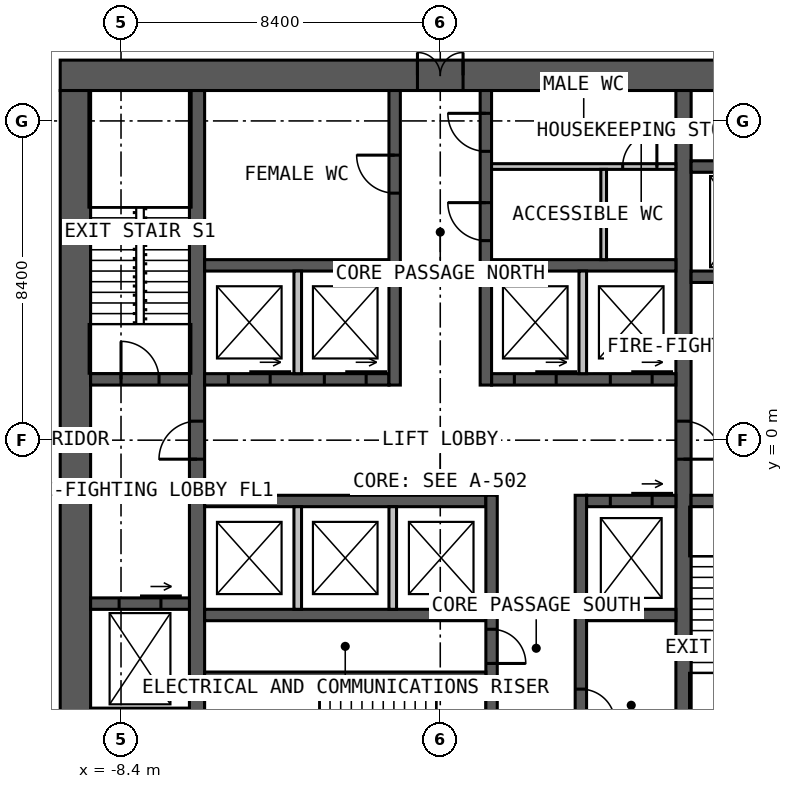
"""IFC4 building model, lengths in metres.
Left out: names, types, materials, properties, quantities, classifications, styles, units other than length and angle.
Written with IfcOpenShell. Run it as: python <this file> out.ifc"""

import sys

from ifc_helpers import new_model, si_unit, direction, frame, frame_2d, origin, place, context, subcontext, project, spatial, rectangle, extrude, element, fill, save


model = new_model("IFC4")
c1 = context("Model", 3, precision=1e-05, world=origin(), true_north=direction((0.0, 1.0)))
c2 = subcontext(c1, "Body", "Model", "MODEL_VIEW")
j1 = project(units=[si_unit("LENGTHUNIT", "METRE"), si_unit("PLANEANGLEUNIT", "RADIAN")], contexts=[c1])
p1 = place(None, origin())
s1 = spatial("IfcSite", under=j1, at=p1, CompositionType="ELEMENT")
p2 = place(p1, origin())
s2 = spatial("IfcBuilding", under=s1, at=p2, CompositionType="ELEMENT")
p3 = place(p2, frame((0.0, 0.0, 57.0)))
s3 = spatial("IfcBuildingStorey", under=s2, at=p3, CompositionType="ELEMENT", Elevation=57.0)
p4 = place(p3, frame((-10.0, 9.6, 0.0), z_axis=(0.0, 0.0, 1.0), x_axis=(1.0, 0.0, 0.0)))
e1 = element("IfcWall", 1, at=p4, inside=s3, PredefinedType="SOLIDWALL", context=c2, shape_type="SweptSolid", body=[
    extrude(rectangle(XDim=20.0, YDim=0.8, at=frame_2d((10.0, 0.0))), origin(), (0.0, 0.0, 1.0), 4.0),
])
p5 = place(p4, frame((9.4, 0.0, 0.0)))
e2 = element("IfcOpeningElement", 2, at=p5, cuts=e1, PredefinedType="OPENING", context=c2, shape_type="SweptSolid", body=[
    extrude(rectangle(XDim=1.2, YDim=2.2, at=frame_2d((0.6, 1.1))), frame((0.0, 0.41, 0.0), z_axis=(0.0, -1.0, 0.0), x_axis=(1.0, 0.0, 0.0)), (0.0, 0.0, 1.0), 0.82),
])
p6 = place(p3, frame((-9.6, 9.2, 0.0), z_axis=(0.0, 0.0, 1.0), x_axis=(0.0, -1.0, 0.0)))
e3 = element("IfcWall", 3, at=p6, inside=s3, PredefinedType="SOLIDWALL", context=c2, shape_type="SweptSolid", body=[
    extrude(rectangle(XDim=18.4, YDim=0.8, at=frame_2d((9.2, 0.0))), origin(), (0.0, 0.0, 1.0), 4.0),
])
p7 = place(p3, frame((-6.4, -9.2, 0.0), z_axis=(0.0, 0.0, 1.0), x_axis=(0.0, 1.0, 0.0)))
e4 = element("IfcWall", 4, at=p7, inside=s3, PredefinedType="SOLIDWALL", context=c2, shape_type="SweptSolid", body=[
    extrude(rectangle(XDim=18.4, YDim=0.4, at=frame_2d((9.2, 0.0))), origin(), (0.0, 0.0, 1.0), 4.0),
])
p8 = place(p7, frame((8.7, 0.0, 0.0)))
e5 = element("IfcOpeningElement", 5, at=p8, cuts=e4, PredefinedType="OPENING", context=c2, shape_type="SweptSolid", body=[
    extrude(rectangle(XDim=1.0, YDim=2.2, at=frame_2d((0.5, 1.1))), frame((0.0, 0.21, 0.0), z_axis=(0.0, -1.0, 0.0), x_axis=(1.0, 0.0, 0.0)), (0.0, 0.0, 1.0), 0.42),
])
p9 = place(p3, frame((6.4, 9.2, 0.0), z_axis=(0.0, 0.0, 1.0), x_axis=(0.0, -1.0, 0.0)))
e6 = element("IfcWall", 6, at=p9, inside=s3, PredefinedType="SOLIDWALL", context=c2, shape_type="SweptSolid", body=[
    extrude(rectangle(XDim=18.4, YDim=0.4, at=frame_2d((9.2, 0.0))), origin(), (0.0, 0.0, 1.0), 4.0),
])
p10 = place(p9, frame((8.7, 0.0, 0.0)))
e7 = element("IfcOpeningElement", 7, at=p10, cuts=e6, PredefinedType="OPENING", context=c2, shape_type="SweptSolid", body=[
    extrude(rectangle(XDim=1.0, YDim=2.2, at=frame_2d((0.5, 1.1))), frame((0.0, 0.21, 0.0), z_axis=(0.0, -1.0, 0.0), x_axis=(1.0, 0.0, 0.0)), (0.0, 0.0, 1.0), 0.42),
])
p11 = place(p3, frame((-6.2, 1.6, 0.0), z_axis=(0.0, 0.0, 1.0), x_axis=(1.0, 0.0, 0.0)))
e8 = element("IfcWall", 8, at=p11, inside=s3, PredefinedType="SOLIDWALL", context=c2, shape_type="SweptSolid", body=[
    extrude(rectangle(XDim=4.85, YDim=0.3, at=frame_2d((2.425, 0.0))), origin(), (0.0, 0.0, 1.0), 4.0),
])
p12 = place(p11, frame((0.625, 0.0, 0.0)))
e9 = element("IfcOpeningElement", 9, at=p12, cuts=e8, PredefinedType="OPENING", context=c2, shape_type="SweptSolid", body=[
    extrude(rectangle(XDim=1.1, YDim=2.2, at=frame_2d((0.55, 1.1))), frame((0.0, 0.16, 0.0), z_axis=(0.0, -1.0, 0.0), x_axis=(1.0, 0.0, 0.0)), (0.0, 0.0, 1.0), 0.32),
])
p13 = place(p11, frame((3.15, 0.0, 0.0)))
e10 = element("IfcOpeningElement", 10, at=p13, cuts=e8, PredefinedType="OPENING", context=c2, shape_type="SweptSolid", body=[
    extrude(rectangle(XDim=1.1, YDim=2.2, at=frame_2d((0.55, 1.1))), frame((0.0, 0.16, 0.0), z_axis=(0.0, -1.0, 0.0), x_axis=(1.0, 0.0, 0.0)), (0.0, 0.0, 1.0), 0.32),
])
p14 = place(p3, frame((1.35, 1.6, 0.0), z_axis=(0.0, 0.0, 1.0), x_axis=(1.0, 0.0, 0.0)))
e11 = element("IfcWall", 11, at=p14, inside=s3, PredefinedType="SOLIDWALL", context=c2, shape_type="SweptSolid", body=[
    extrude(rectangle(XDim=4.85, YDim=0.3, at=frame_2d((2.425, 0.0))), origin(), (0.0, 0.0, 1.0), 4.0),
])
p15 = place(p14, frame((0.6, 0.0, 0.0)))
e12 = element("IfcOpeningElement", 12, at=p15, cuts=e11, PredefinedType="OPENING", context=c2, shape_type="SweptSolid", body=[
    extrude(rectangle(XDim=1.1, YDim=2.2, at=frame_2d((0.55, 1.1))), frame((0.0, 0.16, 0.0), z_axis=(0.0, -1.0, 0.0), x_axis=(1.0, 0.0, 0.0)), (0.0, 0.0, 1.0), 0.32),
])
p16 = place(p14, frame((3.125, 0.0, 0.0)))
e13 = element("IfcOpeningElement", 13, at=p16, cuts=e11, PredefinedType="OPENING", context=c2, shape_type="SweptSolid", body=[
    extrude(rectangle(XDim=1.1, YDim=2.2, at=frame_2d((0.55, 1.1))), frame((0.0, 0.16, 0.0), z_axis=(0.0, -1.0, 0.0), x_axis=(1.0, 0.0, 0.0)), (0.0, 0.0, 1.0), 0.32),
])
for number, where, z_axis, x_axis in (
    (14, (-6.2, 4.6, 0.0), (0.0, 0.0, 1.0), (1.0, 0.0, 0.0)),
    (15, (1.35, 4.6, 0.0), (0.0, 0.0, 1.0), (1.0, 0.0, 0.0)),
):
    element("IfcWall", number, at=place(p3, frame(where, z_axis=z_axis, x_axis=x_axis)), inside=s3, PredefinedType="SOLIDWALL", context=c2, shape_type="SweptSolid", body=[
        extrude(rectangle(XDim=4.85, YDim=0.3, at=frame_2d((2.425, 0.0))), origin(), (0.0, 0.0, 1.0), 4.0),
    ])
p17 = place(p3, frame((-1.2, 1.45, 0.0), z_axis=(0.0, 0.0, 1.0), x_axis=(0.0, 1.0, 0.0)))
e16 = element("IfcWall", 16, at=p17, inside=s3, PredefinedType="SOLIDWALL", context=c2, shape_type="SweptSolid", body=[
    extrude(rectangle(XDim=7.75, YDim=0.3, at=frame_2d((3.875, 0.0))), origin(), (0.0, 0.0, 1.0), 4.0),
])
p18 = place(p17, frame((5.05, 0.0, 0.0)))
e17 = element("IfcOpeningElement", 17, at=p18, cuts=e16, PredefinedType="OPENING", context=c2, shape_type="SweptSolid", body=[
    extrude(rectangle(XDim=1.0, YDim=2.2, at=frame_2d((0.5, 1.1))), frame((0.0, 0.16, 0.0), z_axis=(0.0, -1.0, 0.0), x_axis=(1.0, 0.0, 0.0)), (0.0, 0.0, 1.0), 0.32),
])
p19 = place(p3, frame((1.2, 1.45, 0.0), z_axis=(0.0, 0.0, 1.0), x_axis=(0.0, 1.0, 0.0)))
e18 = element("IfcWall", 18, at=p19, inside=s3, PredefinedType="SOLIDWALL", context=c2, shape_type="SweptSolid", body=[
    extrude(rectangle(XDim=7.75, YDim=0.3, at=frame_2d((3.875, 0.0))), origin(), (0.0, 0.0, 1.0), 4.0),
])
p20 = place(p19, frame((3.8, 0.0, 0.0)))
e19 = element("IfcOpeningElement", 19, at=p20, cuts=e18, PredefinedType="OPENING", context=c2, shape_type="SweptSolid", body=[
    extrude(rectangle(XDim=1.0, YDim=2.2, at=frame_2d((0.5, 1.1))), frame((0.0, 0.16, 0.0), z_axis=(0.0, -1.0, 0.0), x_axis=(1.0, 0.0, 0.0)), (0.0, 0.0, 1.0), 0.32),
])
p21 = place(p19, frame((6.15, 0.0, 0.0)))
e20 = element("IfcOpeningElement", 20, at=p21, cuts=e18, PredefinedType="OPENING", context=c2, shape_type="SweptSolid", body=[
    extrude(rectangle(XDim=1.0, YDim=2.2, at=frame_2d((0.5, 1.1))), frame((0.0, 0.16, 0.0), z_axis=(0.0, -1.0, 0.0), x_axis=(1.0, 0.0, 0.0)), (0.0, 0.0, 1.0), 0.32),
])
p22 = place(p3, frame((-6.2, -1.6, 0.0), z_axis=(0.0, 0.0, 1.0), x_axis=(1.0, 0.0, 0.0)))
e21 = element("IfcWall", 21, at=p22, inside=s3, PredefinedType="SOLIDWALL", context=c2, shape_type="SweptSolid", body=[
    extrude(rectangle(XDim=7.4, YDim=0.3, at=frame_2d((3.7, 0.0))), origin(), (0.0, 0.0, 1.0), 4.0),
])
p23 = place(p3, frame((3.85, -1.6, 0.0), z_axis=(0.0, 0.0, 1.0), x_axis=(1.0, 0.0, 0.0)))
e22 = element("IfcWall", 22, at=p23, inside=s3, PredefinedType="SOLIDWALL", context=c2, shape_type="SweptSolid", body=[
    extrude(rectangle(XDim=2.35, YDim=0.3, at=frame_2d((1.175, 0.0))), origin(), (0.0, 0.0, 1.0), 4.0),
])
p24 = place(p23, frame((0.625, 0.0, 0.0)))
e23 = element("IfcOpeningElement", 23, at=p24, cuts=e22, PredefinedType="OPENING", context=c2, shape_type="SweptSolid", body=[
    extrude(rectangle(XDim=1.1, YDim=2.2, at=frame_2d((0.55, 1.1))), frame((0.0, 0.16, 0.0), z_axis=(0.0, -1.0, 0.0), x_axis=(1.0, 0.0, 0.0)), (0.0, 0.0, 1.0), 0.32),
])
p25 = place(p3, frame((-6.2, -4.6, 0.0), z_axis=(0.0, 0.0, 1.0), x_axis=(1.0, 0.0, 0.0)))
e24 = element("IfcWall", 24, at=p25, inside=s3, PredefinedType="SOLIDWALL", context=c2, shape_type="SweptSolid", body=[
    extrude(rectangle(XDim=7.4, YDim=0.3, at=frame_2d((3.7, 0.0))), origin(), (0.0, 0.0, 1.0), 4.0),
])
p26 = place(p3, frame((3.85, -4.6, 0.0), z_axis=(0.0, 0.0, 1.0), x_axis=(1.0, 0.0, 0.0)))
e25 = element("IfcWall", 25, at=p26, inside=s3, PredefinedType="SOLIDWALL", context=c2, shape_type="SweptSolid", body=[
    extrude(rectangle(XDim=2.35, YDim=0.3, at=frame_2d((1.175, 0.0))), origin(), (0.0, 0.0, 1.0), 4.0),
])
p27 = place(p3, frame((1.35, -1.45, 0.0), z_axis=(0.0, 0.0, 1.0), x_axis=(0.0, -1.0, 0.0)))
e26 = element("IfcWall", 26, at=p27, inside=s3, PredefinedType="SOLIDWALL", context=c2, shape_type="SweptSolid", body=[
    extrude(rectangle(XDim=7.75, YDim=0.3, at=frame_2d((3.875, 0.0))), origin(), (0.0, 0.0, 1.0), 4.0),
])
p28 = place(p27, frame((5.8, 0.0, 0.0)))
e27 = element("IfcOpeningElement", 27, at=p28, cuts=e26, PredefinedType="OPENING", context=c2, shape_type="SweptSolid", body=[
    extrude(rectangle(XDim=1.0, YDim=2.2, at=frame_2d((0.5, 1.1))), frame((0.0, 0.16, 0.0), z_axis=(0.0, -1.0, 0.0), x_axis=(1.0, 0.0, 0.0)), (0.0, 0.0, 1.0), 0.32),
])
p29 = place(p27, frame((3.525, 0.0, 0.0)))
e28 = element("IfcOpeningElement", 28, at=p29, cuts=e26, PredefinedType="OPENING", context=c2, shape_type="SweptSolid", body=[
    extrude(rectangle(XDim=0.9, YDim=2.2, at=frame_2d((0.45, 1.1))), frame((0.0, 0.16, 0.0), z_axis=(0.0, -1.0, 0.0), x_axis=(1.0, 0.0, 0.0)), (0.0, 0.0, 1.0), 0.32),
])
p30 = place(p3, frame((3.7, -1.45, 0.0), z_axis=(0.0, 0.0, 1.0), x_axis=(0.0, -1.0, 0.0)))
e29 = element("IfcWall", 29, at=p30, inside=s3, PredefinedType="SOLIDWALL", context=c2, shape_type="SweptSolid", body=[
    extrude(rectangle(XDim=7.75, YDim=0.3, at=frame_2d((3.875, 0.0))), origin(), (0.0, 0.0, 1.0), 4.0),
])
p31 = place(p30, frame((5.1, 0.0, 0.0)))
e30 = element("IfcOpeningElement", 30, at=p31, cuts=e29, PredefinedType="OPENING", context=c2, shape_type="SweptSolid", body=[
    extrude(rectangle(XDim=0.9, YDim=2.2, at=frame_2d((0.45, 1.1))), frame((0.0, 0.16, 0.0), z_axis=(0.0, -1.0, 0.0), x_axis=(1.0, 0.0, 0.0)), (0.0, 0.0, 1.0), 0.32),
])
p32 = place(p3, frame((-6.2, -6.2, 0.0), z_axis=(0.0, 0.0, 1.0), x_axis=(1.0, 0.0, 0.0)))
e31 = element("IfcWall", 31, at=p32, inside=s3, PredefinedType="SOLIDWALL", context=c2, shape_type="SweptSolid", body=[
    extrude(rectangle(XDim=7.4, YDim=0.2, at=frame_2d((3.7, 0.0))), origin(), (0.0, 0.0, 1.0), 4.0),
])
p33 = place(p3, frame((-9.2, 1.6, 0.0), z_axis=(0.0, 0.0, 1.0), x_axis=(1.0, 0.0, 0.0)))
e32 = element("IfcWall", 32, at=p33, inside=s3, PredefinedType="SOLIDWALL", context=c2, shape_type="SweptSolid", body=[
    extrude(rectangle(XDim=2.6, YDim=0.3, at=frame_2d((1.3, 0.0))), origin(), (0.0, 0.0, 1.0), 4.0),
])
p34 = place(p33, frame((0.8, 0.0, 0.0)))
e33 = element("IfcOpeningElement", 33, at=p34, cuts=e32, PredefinedType="OPENING", context=c2, shape_type="SweptSolid", body=[
    extrude(rectangle(XDim=1.0, YDim=2.2, at=frame_2d((0.5, 1.1))), frame((0.0, 0.16, 0.0), z_axis=(0.0, -1.0, 0.0), x_axis=(1.0, 0.0, 0.0)), (0.0, 0.0, 1.0), 0.32),
])
p35 = place(p3, frame((6.6, -1.6, 0.0), z_axis=(0.0, 0.0, 1.0), x_axis=(1.0, 0.0, 0.0)))
e34 = element("IfcWall", 34, at=p35, inside=s3, PredefinedType="SOLIDWALL", context=c2, shape_type="SweptSolid", body=[
    extrude(rectangle(XDim=2.6, YDim=0.3, at=frame_2d((1.3, 0.0))), origin(), (0.0, 0.0, 1.0), 4.0),
])
p36 = place(p35, frame((0.8, 0.0, 0.0)))
e35 = element("IfcOpeningElement", 35, at=p36, cuts=e34, PredefinedType="OPENING", context=c2, shape_type="SweptSolid", body=[
    extrude(rectangle(XDim=1.0, YDim=2.2, at=frame_2d((0.5, 1.1))), frame((0.0, 0.16, 0.0), z_axis=(0.0, -1.0, 0.0), x_axis=(1.0, 0.0, 0.0)), (0.0, 0.0, 1.0), 0.32),
])
p37 = place(p3, frame((-9.2, -4.3, 0.0), z_axis=(0.0, 0.0, 1.0), x_axis=(1.0, 0.0, 0.0)))
e36 = element("IfcWall", 36, at=p37, inside=s3, PredefinedType="SOLIDWALL", context=c2, shape_type="SweptSolid", body=[
    extrude(rectangle(XDim=2.6, YDim=0.3, at=frame_2d((1.3, 0.0))), origin(), (0.0, 0.0, 1.0), 4.0),
])
p38 = place(p37, frame((0.75, 0.0, 0.0)))
e37 = element("IfcOpeningElement", 37, at=p38, cuts=e36, PredefinedType="OPENING", context=c2, shape_type="SweptSolid", body=[
    extrude(rectangle(XDim=1.1, YDim=2.2, at=frame_2d((0.55, 1.1))), frame((0.0, 0.16, 0.0), z_axis=(0.0, -1.0, 0.0), x_axis=(1.0, 0.0, 0.0)), (0.0, 0.0, 1.0), 0.32),
])
p39 = place(p3, frame((6.6, 4.3, 0.0), z_axis=(0.0, 0.0, 1.0), x_axis=(1.0, 0.0, 0.0)))
e38 = element("IfcWall", 38, at=p39, inside=s3, PredefinedType="SOLIDWALL", context=c2, shape_type="SweptSolid", body=[
    extrude(rectangle(XDim=2.6, YDim=0.3, at=frame_2d((1.3, 0.0))), origin(), (0.0, 0.0, 1.0), 4.0),
])
p40 = place(p39, frame((0.75, 0.0, 0.0)))
e39 = element("IfcOpeningElement", 39, at=p40, cuts=e38, PredefinedType="OPENING", context=c2, shape_type="SweptSolid", body=[
    extrude(rectangle(XDim=1.1, YDim=2.2, at=frame_2d((0.55, 1.1))), frame((0.0, 0.16, 0.0), z_axis=(0.0, -1.0, 0.0), x_axis=(1.0, 0.0, 0.0)), (0.0, 0.0, 1.0), 0.32),
])
for number, where, z_axis, x_axis in (
    (40, (-9.2, -7.2, 0.0), (0.0, 0.0, 1.0), (1.0, 0.0, 0.0)),
    (41, (6.6, 7.2, 0.0), (0.0, 0.0, 1.0), (1.0, 0.0, 0.0)),
):
    element("IfcWall", number, at=place(p3, frame(where, z_axis=z_axis, x_axis=x_axis)), inside=s3, PredefinedType="SOLIDWALL", context=c2, shape_type="SweptSolid", body=[
        extrude(rectangle(XDim=2.6, YDim=0.3, at=frame_2d((1.3, 0.0))), origin(), (0.0, 0.0, 1.0), 4.0),
    ])
for number, where, z_axis, x_axis in (
    (42, (-3.75, 1.75, 0.0), (0.0, 0.0, 1.0), (0.0, 1.0, 0.0)),
    (43, (3.75, 1.75, 0.0), (0.0, 0.0, 1.0), (0.0, 1.0, 0.0)),
    (44, (-3.75, -1.75, 0.0), (0.0, 0.0, 1.0), (0.0, -1.0, 0.0)),
    (45, (-1.25, -1.75, 0.0), (0.0, 0.0, 1.0), (0.0, -1.0, 0.0)),
):
    element("IfcWall", number, at=place(p3, frame(where, z_axis=z_axis, x_axis=x_axis)), inside=s3, PredefinedType="SOLIDWALL", context=c2, shape_type="SweptSolid", body=[
        extrude(rectangle(XDim=2.7, YDim=0.2, at=frame_2d((1.35, 0.0))), origin(), (0.0, 0.0, 1.0), 3.75),
    ])
p41 = place(p3, frame((1.35, 7.2, 0.0), z_axis=(0.0, 0.0, 1.0), x_axis=(1.0, 0.0, 0.0)))
e46 = element("IfcWall", 46, at=p41, inside=s3, PredefinedType="PARTITIONING", context=c2, shape_type="SweptSolid", body=[
    extrude(rectangle(XDim=4.85, YDim=0.15, at=frame_2d((2.425, 0.0))), origin(), (0.0, 0.0, 1.0), 3.75),
])
p42 = place(p41, frame((3.45, 0.0, 0.0)))
e47 = element("IfcOpeningElement", 47, at=p42, cuts=e46, PredefinedType="OPENING", context=c2, shape_type="SweptSolid", body=[
    extrude(rectangle(XDim=0.9, YDim=2.2, at=frame_2d((0.45, 1.1))), frame((0.0, 0.085, 0.0), z_axis=(0.0, -1.0, 0.0), x_axis=(1.0, 0.0, 0.0)), (0.0, 0.0, 1.0), 0.17),
])
p43 = place(p3, frame((4.3, 4.75, 0.0), z_axis=(0.0, 0.0, 1.0), x_axis=(0.0, 1.0, 0.0)))
e48 = element("IfcWall", 48, at=p43, inside=s3, PredefinedType="PARTITIONING", context=c2, shape_type="SweptSolid", body=[
    extrude(rectangle(XDim=2.375, YDim=0.15, at=frame_2d((1.188, 0.0))), origin(), (0.0, 0.0, 1.0), 3.75),
])
p44 = place(p5, origin())
e49 = element("IfcDoor", 49, at=p44, inside=s3, OperationType="DOUBLE_DOOR_SINGLE_SWING", PredefinedType="DOOR", context=c2, shape_type="SweptSolid", body=[
    extrude(rectangle(XDim=1.2, YDim=2.2, at=frame_2d((0.6, 1.1))), frame((0.0, 0.025, 0.0), z_axis=(0.0, -1.0, 0.0), x_axis=(1.0, 0.0, 0.0)), (0.0, 0.0, 1.0), 0.05),
])
fill(e2, e49)
p45 = place(p8, origin())
e50 = element("IfcDoor", 50, at=p45, inside=s3, OperationType="SINGLE_SWING_LEFT", PredefinedType="DOOR", context=c2, shape_type="SweptSolid", body=[
    extrude(rectangle(XDim=1.0, YDim=2.2, at=frame_2d((0.5, 1.1))), frame((0.0, 0.025, 0.0), z_axis=(0.0, -1.0, 0.0), x_axis=(1.0, 0.0, 0.0)), (0.0, 0.0, 1.0), 0.05),
])
fill(e5, e50)
p46 = place(p10, origin())
e51 = element("IfcDoor", 51, at=p46, inside=s3, OperationType="SINGLE_SWING_RIGHT", PredefinedType="DOOR", context=c2, shape_type="SweptSolid", body=[
    extrude(rectangle(XDim=1.0, YDim=2.2, at=frame_2d((0.5, 1.1))), frame((0.0, 0.025, 0.0), z_axis=(0.0, -1.0, 0.0), x_axis=(1.0, 0.0, 0.0)), (0.0, 0.0, 1.0), 0.05),
])
fill(e7, e51)
p47 = place(p34, origin())
e52 = element("IfcDoor", 52, at=p47, inside=s3, OperationType="SINGLE_SWING_LEFT", PredefinedType="DOOR", context=c2, shape_type="SweptSolid", body=[
    extrude(rectangle(XDim=1.0, YDim=2.2, at=frame_2d((0.5, 1.1))), frame((0.0, 0.025, 0.0), z_axis=(0.0, -1.0, 0.0), x_axis=(1.0, 0.0, 0.0)), (0.0, 0.0, 1.0), 0.05),
])
fill(e33, e52)
p48 = place(p18, origin())
e53 = element("IfcDoor", 53, at=p48, inside=s3, OperationType="SINGLE_SWING_RIGHT", PredefinedType="DOOR", context=c2, shape_type="SweptSolid", body=[
    extrude(rectangle(XDim=1.0, YDim=2.2, at=frame_2d((0.5, 1.1))), frame((0.0, 0.025, 0.0), z_axis=(0.0, -1.0, 0.0), x_axis=(1.0, 0.0, 0.0)), (0.0, 0.0, 1.0), 0.05),
])
fill(e17, e53)
p49 = place(p20, origin())
e54 = element("IfcDoor", 54, at=p49, inside=s3, OperationType="SINGLE_SWING_RIGHT", PredefinedType="DOOR", context=c2, shape_type="SweptSolid", body=[
    extrude(rectangle(XDim=1.0, YDim=2.2, at=frame_2d((0.5, 1.1))), frame((0.0, 0.025, 0.0), z_axis=(0.0, -1.0, 0.0), x_axis=(1.0, 0.0, 0.0)), (0.0, 0.0, 1.0), 0.05),
])
fill(e19, e54)
p50 = place(p21, origin())
e55 = element("IfcDoor", 55, at=p50, inside=s3, OperationType="SINGLE_SWING_RIGHT", PredefinedType="DOOR", context=c2, shape_type="SweptSolid", body=[
    extrude(rectangle(XDim=1.0, YDim=2.2, at=frame_2d((0.5, 1.1))), frame((0.0, 0.025, 0.0), z_axis=(0.0, -1.0, 0.0), x_axis=(1.0, 0.0, 0.0)), (0.0, 0.0, 1.0), 0.05),
])
fill(e20, e55)
p51 = place(p29, origin())
e56 = element("IfcDoor", 56, at=p51, inside=s3, OperationType="SINGLE_SWING_RIGHT", PredefinedType="DOOR", context=c2, shape_type="SweptSolid", body=[
    extrude(rectangle(XDim=0.9, YDim=2.2, at=frame_2d((0.45, 1.1))), frame((0.0, 0.025, 0.0), z_axis=(0.0, -1.0, 0.0), x_axis=(1.0, 0.0, 0.0)), (0.0, 0.0, 1.0), 0.05),
])
fill(e28, e56)
p52 = place(p31, origin())
e57 = element("IfcDoor", 57, at=p52, inside=s3, OperationType="SINGLE_SWING_RIGHT", PredefinedType="DOOR", context=c2, shape_type="SweptSolid", body=[
    extrude(rectangle(XDim=0.9, YDim=2.2, at=frame_2d((0.45, 1.1))), frame((0.0, 0.025, 0.0), z_axis=(0.0, -1.0, 0.0), x_axis=(1.0, 0.0, 0.0)), (0.0, 0.0, 1.0), 0.05),
])
fill(e30, e57)
p53 = place(p42, origin())
e58 = element("IfcDoor", 58, at=p53, inside=s3, OperationType="SINGLE_SWING_RIGHT", PredefinedType="DOOR", context=c2, shape_type="SweptSolid", body=[
    extrude(rectangle(XDim=0.9, YDim=2.2, at=frame_2d((0.45, 1.1))), frame((0.0, 0.025, 0.0), z_axis=(0.0, -1.0, 0.0), x_axis=(1.0, 0.0, 0.0)), (0.0, 0.0, 1.0), 0.05),
])
fill(e47, e58)
p54 = place(p12, origin())
e59 = element("IfcDoor", 59, at=p54, inside=s3, OperationType="SLIDING_TO_LEFT", PredefinedType="DOOR", context=c2, shape_type="SweptSolid", body=[
    extrude(rectangle(XDim=1.1, YDim=2.2, at=frame_2d((0.55, 1.1))), frame((0.0, 0.025, 0.0), z_axis=(0.0, -1.0, 0.0), x_axis=(1.0, 0.0, 0.0)), (0.0, 0.0, 1.0), 0.05),
])
fill(e9, e59)
p55 = place(p13, origin())
e60 = element("IfcDoor", 60, at=p55, inside=s3, OperationType="SLIDING_TO_LEFT", PredefinedType="DOOR", context=c2, shape_type="SweptSolid", body=[
    extrude(rectangle(XDim=1.1, YDim=2.2, at=frame_2d((0.55, 1.1))), frame((0.0, 0.025, 0.0), z_axis=(0.0, -1.0, 0.0), x_axis=(1.0, 0.0, 0.0)), (0.0, 0.0, 1.0), 0.05),
])
fill(e10, e60)
p56 = place(p15, origin())
e61 = element("IfcDoor", 61, at=p56, inside=s3, OperationType="SLIDING_TO_LEFT", PredefinedType="DOOR", context=c2, shape_type="SweptSolid", body=[
    extrude(rectangle(XDim=1.1, YDim=2.2, at=frame_2d((0.55, 1.1))), frame((0.0, 0.025, 0.0), z_axis=(0.0, -1.0, 0.0), x_axis=(1.0, 0.0, 0.0)), (0.0, 0.0, 1.0), 0.05),
])
fill(e12, e61)
p57 = place(p16, origin())
e62 = element("IfcDoor", 62, at=p57, inside=s3, OperationType="SLIDING_TO_LEFT", PredefinedType="DOOR", context=c2, shape_type="SweptSolid", body=[
    extrude(rectangle(XDim=1.1, YDim=2.2, at=frame_2d((0.55, 1.1))), frame((0.0, 0.025, 0.0), z_axis=(0.0, -1.0, 0.0), x_axis=(1.0, 0.0, 0.0)), (0.0, 0.0, 1.0), 0.05),
])
fill(e13, e62)
p58 = place(p24, origin())
e63 = element("IfcDoor", 63, at=p58, inside=s3, OperationType="SLIDING_TO_LEFT", PredefinedType="DOOR", context=c2, shape_type="SweptSolid", body=[
    extrude(rectangle(XDim=1.1, YDim=2.2, at=frame_2d((0.55, 1.1))), frame((0.0, 0.025, 0.0), z_axis=(0.0, -1.0, 0.0), x_axis=(1.0, 0.0, 0.0)), (0.0, 0.0, 1.0), 0.05),
])
fill(e23, e63)
p59 = place(p38, origin())
e64 = element("IfcDoor", 64, at=p59, inside=s3, OperationType="SLIDING_TO_LEFT", PredefinedType="DOOR", context=c2, shape_type="SweptSolid", body=[
    extrude(rectangle(XDim=1.1, YDim=2.2, at=frame_2d((0.55, 1.1))), frame((0.0, 0.025, 0.0), z_axis=(0.0, -1.0, 0.0), x_axis=(1.0, 0.0, 0.0)), (0.0, 0.0, 1.0), 0.05),
])
fill(e37, e64)
save(model, sys.argv[1])
